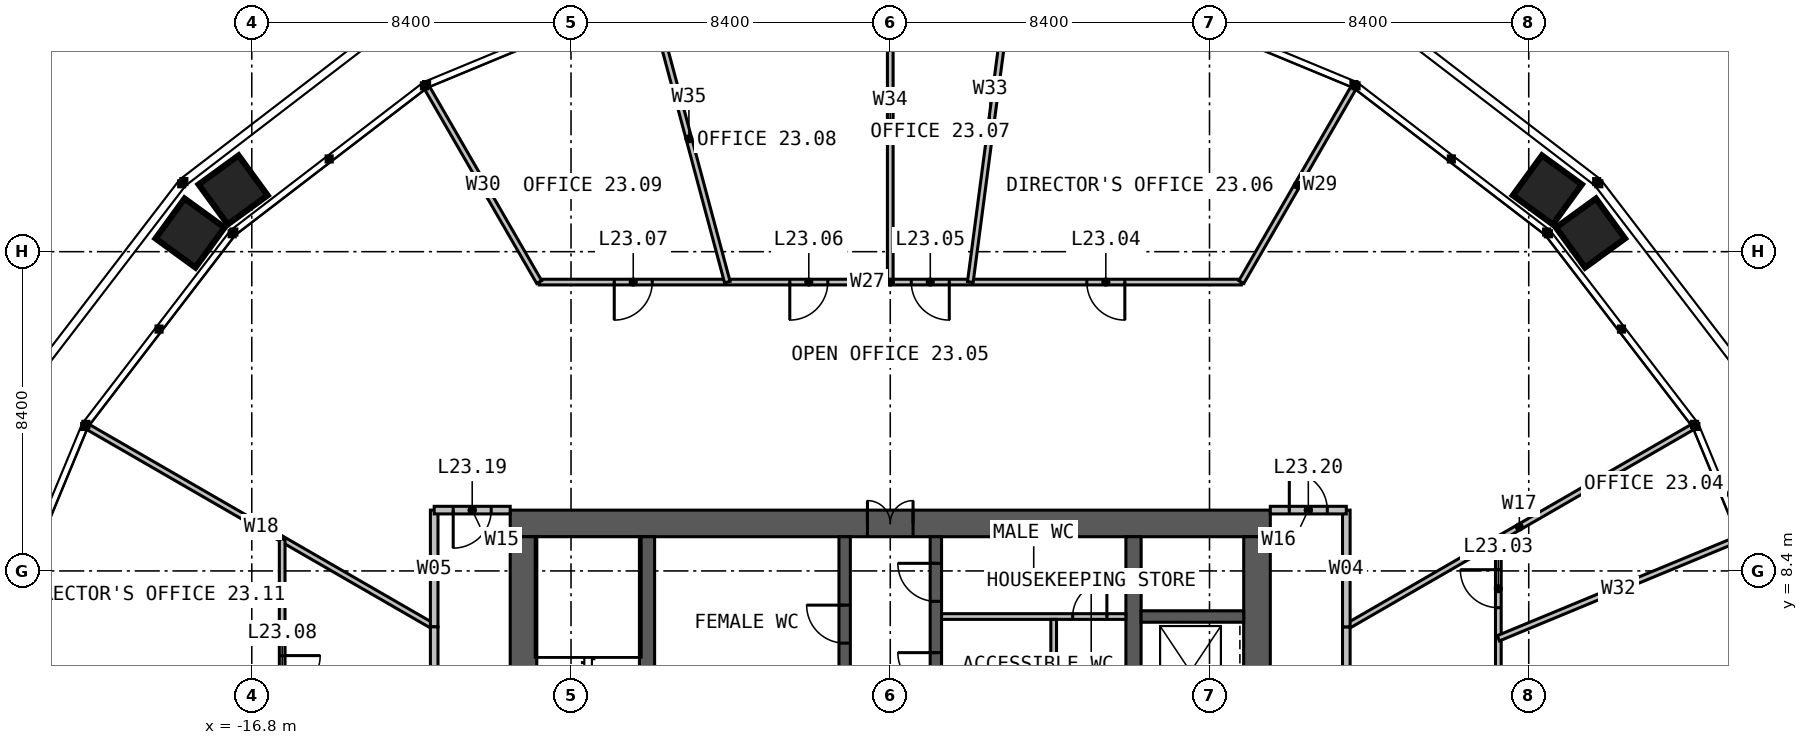
"""IFC4 building model, lengths in metres.
Left out: names, types, materials, properties, quantities, classifications, styles, units other than length and angle.
Written with IfcOpenShell. Run it as: python <this file> out.ifc"""

import sys

from ifc_helpers import new_model, si_unit, direction, frame, frame_2d, origin, place, context, subcontext, project, spatial, rectangle, extrude, element, fill, save


model = new_model("IFC4")
c1 = context("Model", 3, precision=1e-05, world=origin(), true_north=direction((0.0, 1.0)))
c2 = subcontext(c1, "Body", "Model", "MODEL_VIEW")
j1 = project(units=[si_unit("LENGTHUNIT", "METRE"), si_unit("PLANEANGLEUNIT", "RADIAN")], contexts=[c1])
p1 = place(None, origin())
s1 = spatial("IfcSite", under=j1, at=p1, CompositionType="ELEMENT")
p2 = place(p1, origin())
s2 = spatial("IfcBuilding", under=s1, at=p2, CompositionType="ELEMENT")
p3 = place(p2, frame((0.0, 0.0, 98.0)))
s3 = spatial("IfcBuildingStorey", under=s2, at=p3, CompositionType="ELEMENT", Elevation=98.0)
p4 = place(p3, frame((-10.0, 9.65, 0.0), z_axis=(0.0, 0.0, 1.0), x_axis=(1.0, 0.0, 0.0)))
e1 = element("IfcWall", 1, at=p4, inside=s3, PredefinedType="SOLIDWALL", context=c2, shape_type="SweptSolid", body=[
    extrude(rectangle(XDim=20.0, YDim=0.7, at=frame_2d((10.0, 0.0))), origin(), (0.0, 0.0, 1.0), 4.0),
])
p5 = place(p4, frame((9.4, 0.0, 0.0)))
e2 = element("IfcOpeningElement", 2, at=p5, cuts=e1, PredefinedType="OPENING", context=c2, shape_type="SweptSolid", body=[
    extrude(rectangle(XDim=1.2, YDim=2.2, at=frame_2d((0.6, 1.1))), frame((0.0, 0.36, 0.0), z_axis=(0.0, -1.0, 0.0), x_axis=(1.0, 0.0, 0.0)), (0.0, 0.0, 1.0), 0.72),
])
for number, where, z_axis, x_axis in (
    (3, (9.65, -9.3, 0.0), (0.0, 0.0, 1.0), (0.0, 1.0, 0.0)),
    (4, (-9.65, 9.3, 0.0), (0.0, 0.0, 1.0), (0.0, -1.0, 0.0)),
):
    element("IfcWall", number, at=place(p3, frame(where, z_axis=z_axis, x_axis=x_axis)), inside=s3, PredefinedType="SOLIDWALL", context=c2, shape_type="SweptSolid", body=[
        extrude(rectangle(XDim=18.6, YDim=0.7, at=frame_2d((9.3, 0.0))), origin(), (0.0, 0.0, 1.0), 4.0),
    ])
p6 = place(p3, frame((-6.4, -9.3, 0.0), z_axis=(0.0, 0.0, 1.0), x_axis=(0.0, 1.0, 0.0)))
e5 = element("IfcWall", 5, at=p6, inside=s3, PredefinedType="SOLIDWALL", context=c2, shape_type="SweptSolid", body=[
    extrude(rectangle(XDim=18.6, YDim=0.4, at=frame_2d((9.3, 0.0))), origin(), (0.0, 0.0, 1.0), 4.0),
])
p7 = place(p6, frame((8.8, 0.0, 0.0)))
e6 = element("IfcOpeningElement", 6, at=p7, cuts=e5, PredefinedType="OPENING", context=c2, shape_type="SweptSolid", body=[
    extrude(rectangle(XDim=1.0, YDim=2.2, at=frame_2d((0.5, 1.1))), frame((0.0, 0.21, 0.0), z_axis=(0.0, -1.0, 0.0), x_axis=(1.0, 0.0, 0.0)), (0.0, 0.0, 1.0), 0.42),
])
p8 = place(p3, frame((6.4, 9.3, 0.0), z_axis=(0.0, 0.0, 1.0), x_axis=(0.0, -1.0, 0.0)))
e7 = element("IfcWall", 7, at=p8, inside=s3, PredefinedType="SOLIDWALL", context=c2, shape_type="SweptSolid", body=[
    extrude(rectangle(XDim=18.6, YDim=0.4, at=frame_2d((9.3, 0.0))), origin(), (0.0, 0.0, 1.0), 4.0),
])
p9 = place(p8, frame((8.8, 0.0, 0.0)))
e8 = element("IfcOpeningElement", 8, at=p9, cuts=e7, PredefinedType="OPENING", context=c2, shape_type="SweptSolid", body=[
    extrude(rectangle(XDim=1.0, YDim=2.2, at=frame_2d((0.5, 1.1))), frame((0.0, 0.21, 0.0), z_axis=(0.0, -1.0, 0.0), x_axis=(1.0, 0.0, 0.0)), (0.0, 0.0, 1.0), 0.42),
])
p10 = place(p3, frame((-1.2, 1.45, 0.0), z_axis=(0.0, 0.0, 1.0), x_axis=(0.0, 1.0, 0.0)))
e9 = element("IfcWall", 9, at=p10, inside=s3, PredefinedType="SOLIDWALL", context=c2, shape_type="SweptSolid", body=[
    extrude(rectangle(XDim=7.85, YDim=0.3, at=frame_2d((3.925, 0.0))), origin(), (0.0, 0.0, 1.0), 4.0),
])
p11 = place(p10, frame((5.05, 0.0, 0.0)))
e10 = element("IfcOpeningElement", 10, at=p11, cuts=e9, PredefinedType="OPENING", context=c2, shape_type="SweptSolid", body=[
    extrude(rectangle(XDim=1.0, YDim=2.2, at=frame_2d((0.5, 1.1))), frame((0.0, 0.16, 0.0), z_axis=(0.0, -1.0, 0.0), x_axis=(1.0, 0.0, 0.0)), (0.0, 0.0, 1.0), 0.32),
])
p12 = place(p3, frame((1.2, 1.45, 0.0), z_axis=(0.0, 0.0, 1.0), x_axis=(0.0, 1.0, 0.0)))
e11 = element("IfcWall", 11, at=p12, inside=s3, PredefinedType="SOLIDWALL", context=c2, shape_type="SweptSolid", body=[
    extrude(rectangle(XDim=7.85, YDim=0.3, at=frame_2d((3.925, 0.0))), origin(), (0.0, 0.0, 1.0), 4.0),
])
p13 = place(p12, frame((3.8, 0.0, 0.0)))
e12 = element("IfcOpeningElement", 12, at=p13, cuts=e11, PredefinedType="OPENING", context=c2, shape_type="SweptSolid", body=[
    extrude(rectangle(XDim=1.0, YDim=2.2, at=frame_2d((0.5, 1.1))), frame((0.0, 0.16, 0.0), z_axis=(0.0, -1.0, 0.0), x_axis=(1.0, 0.0, 0.0)), (0.0, 0.0, 1.0), 0.32),
])
p14 = place(p12, frame((6.15, 0.0, 0.0)))
e13 = element("IfcOpeningElement", 13, at=p14, cuts=e11, PredefinedType="OPENING", context=c2, shape_type="SweptSolid", body=[
    extrude(rectangle(XDim=1.0, YDim=2.2, at=frame_2d((0.5, 1.1))), frame((0.0, 0.16, 0.0), z_axis=(0.0, -1.0, 0.0), x_axis=(1.0, 0.0, 0.0)), (0.0, 0.0, 1.0), 0.32),
])
p15 = place(p3, frame((6.6, 7.2, 0.0), z_axis=(0.0, 0.0, 1.0), x_axis=(1.0, 0.0, 0.0)))
e14 = element("IfcWall", 14, at=p15, inside=s3, PredefinedType="SOLIDWALL", context=c2, shape_type="SweptSolid", body=[
    extrude(rectangle(XDim=2.7, YDim=0.3, at=frame_2d((1.35, 0.0))), origin(), (0.0, 0.0, 1.0), 4.0),
])
p16 = place(p3, frame((1.35, 7.2, 0.0), z_axis=(0.0, 0.0, 1.0), x_axis=(1.0, 0.0, 0.0)))
e15 = element("IfcWall", 15, at=p16, inside=s3, PredefinedType="PARTITIONING", context=c2, shape_type="SweptSolid", body=[
    extrude(rectangle(XDim=4.85, YDim=0.15, at=frame_2d((2.425, 0.0))), origin(), (0.0, 0.0, 1.0), 3.75),
])
p17 = place(p16, frame((3.45, 0.0, 0.0)))
e16 = element("IfcOpeningElement", 16, at=p17, cuts=e15, PredefinedType="OPENING", context=c2, shape_type="SweptSolid", body=[
    extrude(rectangle(XDim=0.9, YDim=2.2, at=frame_2d((0.45, 1.1))), frame((0.0, 0.085, 0.0), z_axis=(0.0, -1.0, 0.0), x_axis=(1.0, 0.0, 0.0)), (0.0, 0.0, 1.0), 0.17),
])
p18 = place(p3, frame((4.3, 4.75, 0.0), z_axis=(0.0, 0.0, 1.0), x_axis=(0.0, 1.0, 0.0)))
e17 = element("IfcWall", 17, at=p18, inside=s3, PredefinedType="PARTITIONING", context=c2, shape_type="SweptSolid", body=[
    extrude(rectangle(XDim=2.375, YDim=0.15, at=frame_2d((1.188, 0.0))), origin(), (0.0, 0.0, 1.0), 3.75),
])
for number, where, z_axis, x_axis in (
    (18, (12.0, 6.928, 0.0), (0.0, 0.0, 1.0), (0.866, 0.5, 0.0)),
    (19, (-12.0, 6.928, 0.0), (0.0, 0.0, 1.0), (-0.866, 0.5, 0.0)),
):
    element("IfcWall", number, at=place(p3, frame(where, z_axis=z_axis, x_axis=x_axis)), inside=s3, PredefinedType="PARTITIONING", context=c2, shape_type="SweptSolid", body=[
        extrude(rectangle(XDim=10.514, YDim=0.15, at=frame_2d((5.257, 0.0))), origin(), (0.0, 0.0, 1.0), 2.79),
    ])
p19 = place(p3, frame((16.0, -9.238, 0.0), z_axis=(0.0, 0.0, 1.0), x_axis=(0.0, 1.0, 0.0)))
e20 = element("IfcWall", 20, at=p19, inside=s3, PredefinedType="PARTITIONING", context=c2, shape_type="SweptSolid", body=[
    extrude(rectangle(XDim=18.475, YDim=0.15, at=frame_2d((9.238, 0.0))), origin(), (0.0, 0.0, 1.0), 2.79),
])
p20 = place(p19, frame((3.719, 0.0, 0.0)))
e21 = element("IfcOpeningElement", 21, at=p20, cuts=e20, PredefinedType="OPENING", context=c2, shape_type="SweptSolid", body=[
    extrude(rectangle(XDim=1.8, YDim=2.2, at=frame_2d((0.9, 1.1))), frame((0.0, 0.085, 0.0), z_axis=(0.0, -1.0, 0.0), x_axis=(1.0, 0.0, 0.0)), (0.0, 0.0, 1.0), 0.17),
])
p21 = place(p19, frame((12.051, 0.0, 0.0)))
e22 = element("IfcOpeningElement", 22, at=p21, cuts=e20, PredefinedType="OPENING", context=c2, shape_type="SweptSolid", body=[
    extrude(rectangle(XDim=1.0, YDim=2.2, at=frame_2d((0.5, 1.1))), frame((0.0, 0.085, 0.0), z_axis=(0.0, -1.0, 0.0), x_axis=(1.0, 0.0, 0.0)), (0.0, 0.0, 1.0), 0.17),
])
p22 = place(p19, frame((16.67, 0.0, 0.0)))
e23 = element("IfcOpeningElement", 23, at=p22, cuts=e20, PredefinedType="OPENING", context=c2, shape_type="SweptSolid", body=[
    extrude(rectangle(XDim=1.0, YDim=2.2, at=frame_2d((0.5, 1.1))), frame((0.0, 0.085, 0.0), z_axis=(0.0, -1.0, 0.0), x_axis=(1.0, 0.0, 0.0)), (0.0, 0.0, 1.0), 0.17),
])
p23 = place(p3, frame((16.0, 6.627, 0.0), z_axis=(0.0, 0.0, 1.0), x_axis=(0.923878127723, 0.382686823805, 0.0)))
e24 = element("IfcWall", 24, at=p23, inside=s3, PredefinedType="PARTITIONING", context=c2, shape_type="SweptSolid", body=[
    extrude(rectangle(XDim=6.844, YDim=0.15, at=frame_2d((3.422, 0.0))), origin(), (0.0, 0.0, 1.0), 2.79),
])
p24 = place(p3, frame((12.0, -6.928, 0.0), z_axis=(0.0, 0.0, 1.0), x_axis=(0.0, 1.0, 0.0)))
e25 = element("IfcWall", 25, at=p24, inside=s3, PredefinedType="PARTITIONING", context=c2, shape_type="SweptSolid", body=[
    extrude(rectangle(XDim=13.856, YDim=0.2, at=frame_2d((6.928, 0.0))), origin(), (0.0, 0.0, 1.0), 3.8),
])
p25 = place(p24, frame((6.028, 0.0, 0.0)))
e26 = element("IfcOpeningElement", 26, at=p25, cuts=e25, PredefinedType="OPENING", context=c2, shape_type="SweptSolid", body=[
    extrude(rectangle(XDim=1.8, YDim=2.2, at=frame_2d((0.9, 1.1))), frame((0.0, 0.11, 0.0), z_axis=(0.0, -1.0, 0.0), x_axis=(1.0, 0.0, 0.0)), (0.0, 0.0, 1.0), 0.22),
])
p26 = place(p3, frame((12.0, 6.928, 0.0), z_axis=(0.0, 0.0, 1.0), x_axis=(0.0, 1.0, 0.0)))
e27 = element("IfcWall", 27, at=p26, inside=s3, PredefinedType="PARTITIONING", context=c2, shape_type="SweptSolid", body=[
    extrude(rectangle(XDim=3.072, YDim=0.2, at=frame_2d((1.536, 0.0))), origin(), (0.0, 0.0, 1.0), 3.8),
])
p27 = place(p3, frame((9.238, 16.0, 0.0), z_axis=(0.0, 0.0, 1.0), x_axis=(-1.0, 0.0, 0.0)))
e28 = element("IfcWall", 28, at=p27, inside=s3, PredefinedType="PARTITIONING", context=c2, shape_type="SweptSolid", body=[
    extrude(rectangle(XDim=18.475, YDim=0.15, at=frame_2d((9.238, 0.0))), origin(), (0.0, 0.0, 1.0), 2.79),
])
p28 = place(p27, frame((3.066, 0.0, 0.0)))
e29 = element("IfcOpeningElement", 29, at=p28, cuts=e28, PredefinedType="OPENING", context=c2, shape_type="SweptSolid", body=[
    extrude(rectangle(XDim=1.0, YDim=2.2, at=frame_2d((0.5, 1.1))), frame((0.0, 0.085, 0.0), z_axis=(0.0, -1.0, 0.0), x_axis=(1.0, 0.0, 0.0)), (0.0, 0.0, 1.0), 0.17),
])
p29 = place(p27, frame((7.684, 0.0, 0.0)))
e30 = element("IfcOpeningElement", 30, at=p29, cuts=e28, PredefinedType="OPENING", context=c2, shape_type="SweptSolid", body=[
    extrude(rectangle(XDim=1.0, YDim=2.2, at=frame_2d((0.5, 1.1))), frame((0.0, 0.085, 0.0), z_axis=(0.0, -1.0, 0.0), x_axis=(1.0, 0.0, 0.0)), (0.0, 0.0, 1.0), 0.17),
])
p30 = place(p27, frame((10.881, 0.0, 0.0)))
e31 = element("IfcOpeningElement", 31, at=p30, cuts=e28, PredefinedType="OPENING", context=c2, shape_type="SweptSolid", body=[
    extrude(rectangle(XDim=1.0, YDim=2.2, at=frame_2d((0.5, 1.1))), frame((0.0, 0.085, 0.0), z_axis=(0.0, -1.0, 0.0), x_axis=(1.0, 0.0, 0.0)), (0.0, 0.0, 1.0), 0.17),
])
p31 = place(p27, frame((15.5, 0.0, 0.0)))
e32 = element("IfcOpeningElement", 32, at=p31, cuts=e28, PredefinedType="OPENING", context=c2, shape_type="SweptSolid", body=[
    extrude(rectangle(XDim=1.0, YDim=2.2, at=frame_2d((0.5, 1.1))), frame((0.0, 0.085, 0.0), z_axis=(0.0, -1.0, 0.0), x_axis=(1.0, 0.0, 0.0)), (0.0, 0.0, 1.0), 0.17),
])
for number, where, z_axis, x_axis in (
    (33, (9.238, 16.0, 0.0), (0.0, 0.0, 1.0), (0.5, 0.866, 0.0)),
    (34, (-9.238, 16.0, 0.0), (0.0, 0.0, 1.0), (-0.5, 0.866, 0.0)),
):
    element("IfcWall", number, at=place(p3, frame(where, z_axis=z_axis, x_axis=x_axis)), inside=s3, PredefinedType="PARTITIONING", context=c2, shape_type="SweptSolid", body=[
        extrude(rectangle(XDim=5.895, YDim=0.15, at=frame_2d((2.948, 0.0))), origin(), (0.0, 0.0, 1.0), 2.79),
    ])
p32 = place(p3, frame((2.106, 16.0, 0.0), z_axis=(0.0, 0.0, 1.0), x_axis=(0.130533221372, 0.991443935943, 0.0)))
e35 = element("IfcWall", 35, at=p32, inside=s3, PredefinedType="PARTITIONING", context=c2, shape_type="SweptSolid", body=[
    extrude(rectangle(XDim=8.024, YDim=0.15, at=frame_2d((4.012, 0.0))), origin(), (0.0, 0.0, 1.0), 2.79),
])
p33 = place(p3, frame((0.0, 16.0, 0.0), z_axis=(0.0, 0.0, 1.0), x_axis=(0.0, 1.0, 0.0)))
e36 = element("IfcWall", 36, at=p33, inside=s3, PredefinedType="PARTITIONING", context=c2, shape_type="SweptSolid", body=[
    extrude(rectangle(XDim=8.37, YDim=0.15, at=frame_2d((4.185, 0.0))), origin(), (0.0, 0.0, 1.0), 2.79),
])
p34 = place(p3, frame((-4.287, 16.0, 0.0), z_axis=(0.0, 0.0, 1.0), x_axis=(-0.258816859097, 0.965926412025, 0.0)))
e37 = element("IfcWall", 37, at=p34, inside=s3, PredefinedType="PARTITIONING", context=c2, shape_type="SweptSolid", body=[
    extrude(rectangle(XDim=7.806, YDim=0.15, at=frame_2d((3.903, 0.0))), origin(), (0.0, 0.0, 1.0), 2.79),
])
p35 = place(p3, frame((-12.0, 10.0, 0.0), z_axis=(0.0, 0.0, 1.0), x_axis=(0.0, -1.0, 0.0)))
e38 = element("IfcWall", 38, at=p35, inside=s3, PredefinedType="PARTITIONING", context=c2, shape_type="SweptSolid", body=[
    extrude(rectangle(XDim=3.072, YDim=0.2, at=frame_2d((1.536, 0.0))), origin(), (0.0, 0.0, 1.0), 3.8),
])
p36 = place(p3, frame((-16.0, 9.238, 0.0), z_axis=(0.0, 0.0, 1.0), x_axis=(0.0, -1.0, 0.0)))
e39 = element("IfcWall", 39, at=p36, inside=s3, PredefinedType="PARTITIONING", context=c2, shape_type="SweptSolid", body=[
    extrude(rectangle(XDim=18.475, YDim=0.15, at=frame_2d((9.238, 0.0))), origin(), (0.0, 0.0, 1.0), 2.79),
])
p37 = place(p36, frame((3.066, 0.0, 0.0)))
e40 = element("IfcOpeningElement", 40, at=p37, cuts=e39, PredefinedType="OPENING", context=c2, shape_type="SweptSolid", body=[
    extrude(rectangle(XDim=1.0, YDim=2.2, at=frame_2d((0.5, 1.1))), frame((0.0, 0.085, 0.0), z_axis=(0.0, -1.0, 0.0), x_axis=(1.0, 0.0, 0.0)), (0.0, 0.0, 1.0), 0.17),
])
p38 = place(p36, frame((7.684, 0.0, 0.0)))
e41 = element("IfcOpeningElement", 41, at=p38, cuts=e39, PredefinedType="OPENING", context=c2, shape_type="SweptSolid", body=[
    extrude(rectangle(XDim=1.0, YDim=2.2, at=frame_2d((0.5, 1.1))), frame((0.0, 0.085, 0.0), z_axis=(0.0, -1.0, 0.0), x_axis=(1.0, 0.0, 0.0)), (0.0, 0.0, 1.0), 0.17),
])
p39 = place(p36, frame((12.956, 0.0, 0.0)))
e42 = element("IfcOpeningElement", 42, at=p39, cuts=e39, PredefinedType="OPENING", context=c2, shape_type="SweptSolid", body=[
    extrude(rectangle(XDim=1.8, YDim=2.2, at=frame_2d((0.9, 1.1))), frame((0.0, 0.085, 0.0), z_axis=(0.0, -1.0, 0.0), x_axis=(1.0, 0.0, 0.0)), (0.0, 0.0, 1.0), 0.17),
])
p40 = place(p3, frame((-12.0, 6.928, 0.0), z_axis=(0.0, 0.0, 1.0), x_axis=(0.0, -1.0, 0.0)))
e43 = element("IfcWall", 43, at=p40, inside=s3, PredefinedType="PARTITIONING", context=c2, shape_type="SweptSolid", body=[
    extrude(rectangle(XDim=13.856, YDim=0.2, at=frame_2d((6.928, 0.0))), origin(), (0.0, 0.0, 1.0), 3.8),
])
p41 = place(p40, frame((6.028, 0.0, 0.0)))
e44 = element("IfcOpeningElement", 44, at=p41, cuts=e43, PredefinedType="OPENING", context=c2, shape_type="SweptSolid", body=[
    extrude(rectangle(XDim=1.8, YDim=2.2, at=frame_2d((0.9, 1.1))), frame((0.0, 0.11, 0.0), z_axis=(0.0, -1.0, 0.0), x_axis=(1.0, 0.0, 0.0)), (0.0, 0.0, 1.0), 0.22),
])
p42 = place(p3, frame((-10.0, 10.0, 0.0), z_axis=(0.0, 0.0, 1.0), x_axis=(-1.0, 0.0, 0.0)))
e45 = element("IfcWall", 45, at=p42, inside=s3, PredefinedType="PARTITIONING", context=c2, shape_type="SweptSolid", body=[
    extrude(rectangle(XDim=2.0, YDim=0.2, at=frame_2d((1.0, 0.0))), origin(), (0.0, 0.0, 1.0), 3.8),
])
p43 = place(p42, frame((0.5, 0.0, 0.0)))
e46 = element("IfcOpeningElement", 46, at=p43, cuts=e45, PredefinedType="OPENING", context=c2, shape_type="SweptSolid", body=[
    extrude(rectangle(XDim=1.0, YDim=2.2, at=frame_2d((0.5, 1.1))), frame((0.0, 0.11, 0.0), z_axis=(0.0, -1.0, 0.0), x_axis=(1.0, 0.0, 0.0)), (0.0, 0.0, 1.0), 0.22),
])
p44 = place(p3, frame((10.0, 10.0, 0.0), z_axis=(0.0, 0.0, 1.0), x_axis=(1.0, 0.0, 0.0)))
e47 = element("IfcWall", 47, at=p44, inside=s3, PredefinedType="PARTITIONING", context=c2, shape_type="SweptSolid", body=[
    extrude(rectangle(XDim=2.0, YDim=0.2, at=frame_2d((1.0, 0.0))), origin(), (0.0, 0.0, 1.0), 3.8),
])
p45 = place(p44, frame((0.5, 0.0, 0.0)))
e48 = element("IfcOpeningElement", 48, at=p45, cuts=e47, PredefinedType="OPENING", context=c2, shape_type="SweptSolid", body=[
    extrude(rectangle(XDim=1.0, YDim=2.2, at=frame_2d((0.5, 1.1))), frame((0.0, 0.11, 0.0), z_axis=(0.0, -1.0, 0.0), x_axis=(1.0, 0.0, 0.0)), (0.0, 0.0, 1.0), 0.22),
])
p46 = place(p5, origin())
e49 = element("IfcDoor", 49, at=p46, inside=s3, OperationType="DOUBLE_DOOR_SINGLE_SWING", PredefinedType="DOOR", context=c2, shape_type="SweptSolid", body=[
    extrude(rectangle(XDim=1.2, YDim=2.2, at=frame_2d((0.6, 1.1))), frame((0.0, 0.025, 0.0), z_axis=(0.0, -1.0, 0.0), x_axis=(1.0, 0.0, 0.0)), (0.0, 0.0, 1.0), 0.05),
])
fill(e2, e49)
p47 = place(p11, origin())
e50 = element("IfcDoor", 50, at=p47, inside=s3, OperationType="SINGLE_SWING_RIGHT", PredefinedType="DOOR", context=c2, shape_type="SweptSolid", body=[
    extrude(rectangle(XDim=1.0, YDim=2.2, at=frame_2d((0.5, 1.1))), frame((0.0, 0.025, 0.0), z_axis=(0.0, -1.0, 0.0), x_axis=(1.0, 0.0, 0.0)), (0.0, 0.0, 1.0), 0.05),
])
fill(e10, e50)
p48 = place(p13, origin())
e51 = element("IfcDoor", 51, at=p48, inside=s3, OperationType="SINGLE_SWING_RIGHT", PredefinedType="DOOR", context=c2, shape_type="SweptSolid", body=[
    extrude(rectangle(XDim=1.0, YDim=2.2, at=frame_2d((0.5, 1.1))), frame((0.0, 0.025, 0.0), z_axis=(0.0, -1.0, 0.0), x_axis=(1.0, 0.0, 0.0)), (0.0, 0.0, 1.0), 0.05),
])
fill(e12, e51)
p49 = place(p14, origin())
e52 = element("IfcDoor", 52, at=p49, inside=s3, OperationType="SINGLE_SWING_RIGHT", PredefinedType="DOOR", context=c2, shape_type="SweptSolid", body=[
    extrude(rectangle(XDim=1.0, YDim=2.2, at=frame_2d((0.5, 1.1))), frame((0.0, 0.025, 0.0), z_axis=(0.0, -1.0, 0.0), x_axis=(1.0, 0.0, 0.0)), (0.0, 0.0, 1.0), 0.05),
])
fill(e13, e52)
p50 = place(p17, origin())
e53 = element("IfcDoor", 53, at=p50, inside=s3, OperationType="SINGLE_SWING_RIGHT", PredefinedType="DOOR", context=c2, shape_type="SweptSolid", body=[
    extrude(rectangle(XDim=0.9, YDim=2.2, at=frame_2d((0.45, 1.1))), frame((0.0, 0.025, 0.0), z_axis=(0.0, -1.0, 0.0), x_axis=(1.0, 0.0, 0.0)), (0.0, 0.0, 1.0), 0.05),
])
fill(e16, e53)
p51 = place(p22, origin())
e54 = element("IfcDoor", 54, at=p51, inside=s3, OperationType="SINGLE_SWING_RIGHT", PredefinedType="DOOR", context=c2, shape_type="SweptSolid", body=[
    extrude(rectangle(XDim=1.0, YDim=2.2, at=frame_2d((0.5, 1.1))), frame((0.0, 0.025, 0.0), z_axis=(0.0, -1.0, 0.0), x_axis=(1.0, 0.0, 0.0)), (0.0, 0.0, 1.0), 0.05),
])
fill(e23, e54)
p52 = place(p28, origin())
e55 = element("IfcDoor", 55, at=p52, inside=s3, OperationType="SINGLE_SWING_LEFT", PredefinedType="DOOR", context=c2, shape_type="SweptSolid", body=[
    extrude(rectangle(XDim=1.0, YDim=2.2, at=frame_2d((0.5, 1.1))), frame((0.0, 0.025, 0.0), z_axis=(0.0, -1.0, 0.0), x_axis=(1.0, 0.0, 0.0)), (0.0, 0.0, 1.0), 0.05),
])
fill(e29, e55)
p53 = place(p29, origin())
e56 = element("IfcDoor", 56, at=p53, inside=s3, OperationType="SINGLE_SWING_LEFT", PredefinedType="DOOR", context=c2, shape_type="SweptSolid", body=[
    extrude(rectangle(XDim=1.0, YDim=2.2, at=frame_2d((0.5, 1.1))), frame((0.0, 0.025, 0.0), z_axis=(0.0, -1.0, 0.0), x_axis=(1.0, 0.0, 0.0)), (0.0, 0.0, 1.0), 0.05),
])
fill(e30, e56)
p54 = place(p30, origin())
e57 = element("IfcDoor", 57, at=p54, inside=s3, OperationType="SINGLE_SWING_RIGHT", PredefinedType="DOOR", context=c2, shape_type="SweptSolid", body=[
    extrude(rectangle(XDim=1.0, YDim=2.2, at=frame_2d((0.5, 1.1))), frame((0.0, 0.025, 0.0), z_axis=(0.0, -1.0, 0.0), x_axis=(1.0, 0.0, 0.0)), (0.0, 0.0, 1.0), 0.05),
])
fill(e31, e57)
p55 = place(p31, origin())
e58 = element("IfcDoor", 58, at=p55, inside=s3, OperationType="SINGLE_SWING_RIGHT", PredefinedType="DOOR", context=c2, shape_type="SweptSolid", body=[
    extrude(rectangle(XDim=1.0, YDim=2.2, at=frame_2d((0.5, 1.1))), frame((0.0, 0.025, 0.0), z_axis=(0.0, -1.0, 0.0), x_axis=(1.0, 0.0, 0.0)), (0.0, 0.0, 1.0), 0.05),
])
fill(e32, e58)
p56 = place(p37, origin())
e59 = element("IfcDoor", 59, at=p56, inside=s3, OperationType="SINGLE_SWING_LEFT", PredefinedType="DOOR", context=c2, shape_type="SweptSolid", body=[
    extrude(rectangle(XDim=1.0, YDim=2.2, at=frame_2d((0.5, 1.1))), frame((0.0, 0.025, 0.0), z_axis=(0.0, -1.0, 0.0), x_axis=(1.0, 0.0, 0.0)), (0.0, 0.0, 1.0), 0.05),
])
fill(e40, e59)
p57 = place(p43, origin())
e60 = element("IfcDoor", 60, at=p57, inside=s3, OperationType="SINGLE_SWING_RIGHT", PredefinedType="DOOR", context=c2, shape_type="SweptSolid", body=[
    extrude(rectangle(XDim=1.0, YDim=2.2, at=frame_2d((0.5, 1.1))), frame((0.0, 0.025, 0.0), z_axis=(0.0, -1.0, 0.0), x_axis=(1.0, 0.0, 0.0)), (0.0, 0.0, 1.0), 0.05),
])
fill(e46, e60)
p58 = place(p45, origin())
e61 = element("IfcDoor", 61, at=p58, inside=s3, OperationType="SINGLE_SWING_LEFT", PredefinedType="DOOR", context=c2, shape_type="SweptSolid", body=[
    extrude(rectangle(XDim=1.0, YDim=2.2, at=frame_2d((0.5, 1.1))), frame((0.0, 0.025, 0.0), z_axis=(0.0, -1.0, 0.0), x_axis=(1.0, 0.0, 0.0)), (0.0, 0.0, 1.0), 0.05),
])
fill(e48, e61)
save(model, sys.argv[1])
